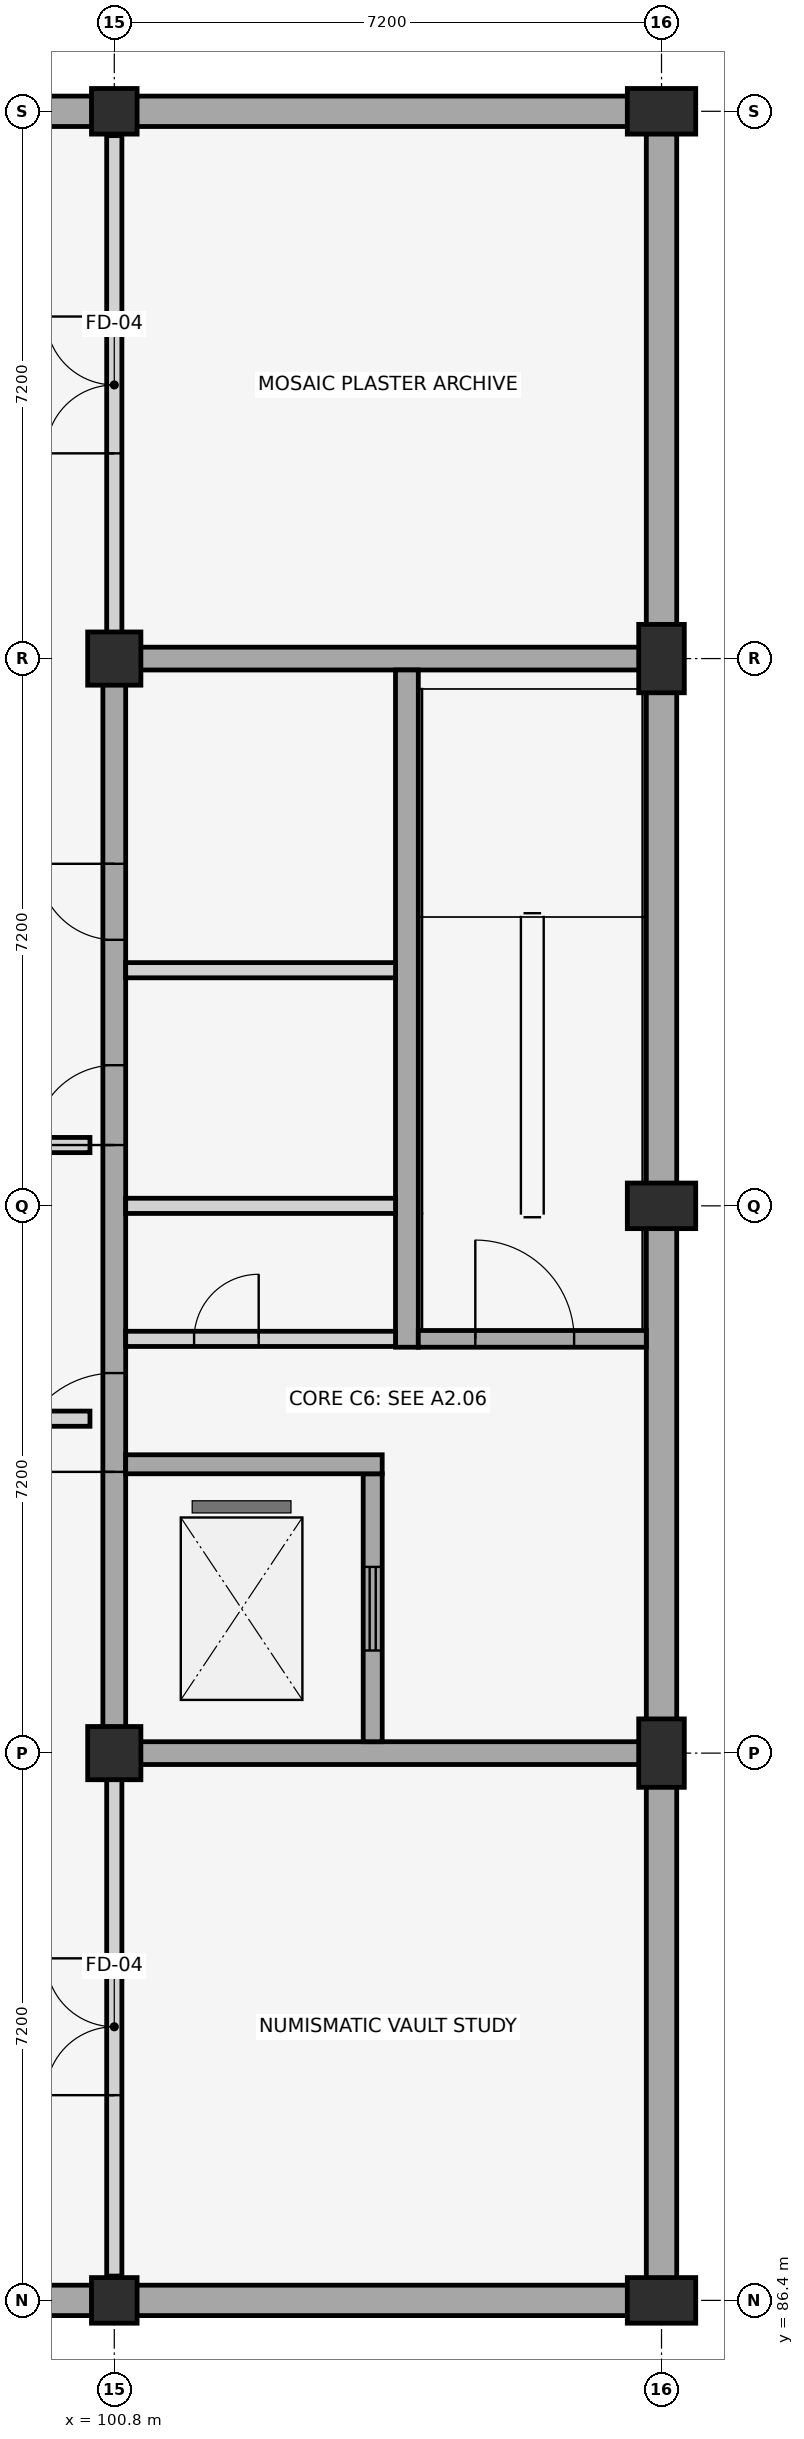
"""IFC4 building model, lengths in metres.
Left out: names, types, materials, properties, quantities, classifications, styles, units other than length and angle.
Written with IfcOpenShell. Run it as: python <this file> out.ifc"""

import sys

from ifc_helpers import new_model, si_unit, direction, frame, frame_2d, origin, origin_2d, place, context, subcontext, project, spatial, rectangle, extrude, element, fill, save


model = new_model("IFC4")
c1 = context("Model", 3, precision=1e-05, world=origin(), true_north=direction((0.0, 1.0)))
c2 = subcontext(c1, "Body", "Model", "MODEL_VIEW")
j1 = project(units=[si_unit("LENGTHUNIT", "METRE"), si_unit("PLANEANGLEUNIT", "RADIAN")], contexts=[c1])
p1 = place(None, origin())
s1 = spatial("IfcSite", under=j1, at=p1, CompositionType="ELEMENT")
p2 = place(p1, origin())
s2 = spatial("IfcBuilding", under=s1, at=p2, CompositionType="ELEMENT")
p3 = place(p2, frame((0.0, 0.0, -4.5)))
s3 = spatial("IfcBuildingStorey", under=s2, at=p3, CompositionType="ELEMENT", Elevation=-4.5)
p4 = place(p3, frame((57.4, 86.4, 0.0), z_axis=(0.0, 0.0, 1.0), x_axis=(1.0, 0.0, 0.0)))
e1 = element("IfcWall", 1, at=p4, inside=s3, PredefinedType="USERDEFINED", context=c2, shape_type="SweptSolid", body=[
    extrude(rectangle(XDim=50.8, YDim=0.4, at=frame_2d((25.4, 0.0))), origin(), (0.0, 0.0, 1.0), 3.67),
])
p5 = place(p4, frame((24.3, 0.0, 0.0)))
e2 = element("IfcOpeningElement", 2, at=p5, cuts=e1, PredefinedType="OPENING", context=c2, shape_type="SweptSolid", body=[
    extrude(rectangle(XDim=1.8, YDim=2.4, at=frame_2d((0.9, 1.2))), frame((0.0, 0.21, 0.0), z_axis=(0.0, -1.0, 0.0), x_axis=(1.0, 0.0, 0.0)), (0.0, 0.0, 1.0), 0.42),
])
p6 = place(p3, frame((108.0, 86.6, 0.0), z_axis=(0.0, 0.0, 1.0), x_axis=(0.0, 1.0, 0.0)))
e3 = element("IfcWall", 3, at=p6, inside=s3, PredefinedType="USERDEFINED", context=c2, shape_type="SweptSolid", body=[
    extrude(rectangle(XDim=28.4, YDim=0.4, at=frame_2d((14.2, 0.0))), origin(), (0.0, 0.0, 1.0), 3.67),
])
p7 = place(p3, frame((108.2, 115.2, 0.0), z_axis=(0.0, 0.0, 1.0), x_axis=(-1.0, 0.0, 0.0)))
e4 = element("IfcWall", 4, at=p7, inside=s3, PredefinedType="USERDEFINED", context=c2, shape_type="SweptSolid", body=[
    extrude(rectangle(XDim=50.8, YDim=0.4, at=frame_2d((25.4, 0.0))), origin(), (0.0, 0.0, 1.0), 3.67),
])
p8 = place(p3, frame((100.8, 86.4, -0.45), z_axis=(0.0, 0.0, 1.0), x_axis=(1.0, 0.0, 0.0)))
e5 = element("IfcColumn", 5, at=p8, inside=s3, PredefinedType="COLUMN", context=c2, shape_type="SweptSolid", body=[
    extrude(rectangle(XDim=0.6, YDim=0.6, at=origin_2d()), origin(), (0.0, 0.0, 1.0), 4.95),
])
for number, where, z_axis, x_axis in (
    (6, (100.8, 93.6, -0.45), (0.0, 0.0, 1.0), (0.0, 1.0, 0.0)),
    (7, (100.8, 108.0, -0.45), (0.0, 0.0, 1.0), (0.0, 1.0, 0.0)),
):
    element("IfcColumn", number, at=place(p3, frame(where, z_axis=z_axis, x_axis=x_axis)), inside=s3, PredefinedType="COLUMN", context=c2, shape_type="SweptSolid", body=[
        extrude(rectangle(XDim=0.7, YDim=0.7, at=origin_2d()), origin(), (0.0, 0.0, 1.0), 4.95),
    ])
p9 = place(p3, frame((100.8, 115.2, -0.45), z_axis=(0.0, 0.0, 1.0), x_axis=(1.0, 0.0, 0.0)))
e8 = element("IfcColumn", 8, at=p9, inside=s3, PredefinedType="COLUMN", context=c2, shape_type="SweptSolid", body=[
    extrude(rectangle(XDim=0.6, YDim=0.6, at=origin_2d()), origin(), (0.0, 0.0, 1.0), 4.95),
])
for number, where, z_axis, x_axis in (
    (9, (108.0, 86.4, -0.45), (0.0, 0.0, 1.0), (0.0, 1.0, 0.0)),
    (10, (108.0, 93.6, -0.45), (0.0, 0.0, 1.0), (1.0, 0.0, 0.0)),
    (11, (108.0, 100.8, -0.45), (0.0, 0.0, 1.0), (0.0, 1.0, 0.0)),
    (12, (108.0, 108.0, -0.45), (0.0, 0.0, 1.0), (1.0, 0.0, 0.0)),
    (13, (108.0, 115.2, -0.45), (0.0, 0.0, 1.0), (0.0, 1.0, 0.0)),
):
    element("IfcColumn", number, at=place(p3, frame(where, z_axis=z_axis, x_axis=x_axis)), inside=s3, PredefinedType="PILASTER", context=c2, shape_type="SweptSolid", body=[
        extrude(rectangle(XDim=0.6, YDim=0.9, at=origin_2d()), origin(), (0.0, 0.0, 1.0), 4.95),
    ])
for number, where, z_axis, x_axis in (
    (14, (100.65, 93.6, 0.0), (0.0, 0.0, 1.0), (1.0, 0.0, 0.0)),
    (15, (100.65, 108.0, 0.0), (0.0, 0.0, 1.0), (1.0, 0.0, 0.0)),
):
    element("IfcWall", number, at=place(p3, frame(where, z_axis=z_axis, x_axis=x_axis)), inside=s3, PredefinedType="SHEAR", context=c2, shape_type="SweptSolid", body=[
        extrude(rectangle(XDim=7.15, YDim=0.3, at=frame_2d((3.575, 0.0))), origin(), (0.0, 0.0, 1.0), 4.25),
    ])
p10 = place(p3, frame((100.8, 93.75, 0.0), z_axis=(0.0, 0.0, 1.0), x_axis=(0.0, 1.0, 0.0)))
e16 = element("IfcWall", 16, at=p10, inside=s3, PredefinedType="SHEAR", context=c2, shape_type="SweptSolid", body=[
    extrude(rectangle(XDim=14.1, YDim=0.3, at=frame_2d((7.05, 0.0))), origin(), (0.0, 0.0, 1.0), 4.25),
])
p11 = place(p10, frame((3.55, 0.0, 0.0)))
e17 = element("IfcOpeningElement", 17, at=p11, cuts=e16, PredefinedType="OPENING", context=c2, shape_type="SweptSolid", body=[
    extrude(rectangle(XDim=1.3, YDim=2.2, at=frame_2d((0.65, 1.1))), frame((0.0, 0.16, 0.0), z_axis=(0.0, -1.0, 0.0), x_axis=(1.0, 0.0, 0.0)), (0.0, 0.0, 1.0), 0.32),
])
p12 = place(p10, frame((7.85, 0.0, 0.0)))
e18 = element("IfcOpeningElement", 18, at=p12, cuts=e16, PredefinedType="OPENING", context=c2, shape_type="SweptSolid", body=[
    extrude(rectangle(XDim=1.05, YDim=2.15, at=frame_2d((0.525, 1.075))), frame((0.0, 0.16, 0.0), z_axis=(0.0, -1.0, 0.0), x_axis=(1.0, 0.0, 0.0)), (0.0, 0.0, 1.0), 0.32),
])
p13 = place(p10, frame((10.55, 0.0, 0.0)))
e19 = element("IfcOpeningElement", 19, at=p13, cuts=e16, PredefinedType="OPENING", context=c2, shape_type="SweptSolid", body=[
    extrude(rectangle(XDim=1.0, YDim=2.15, at=frame_2d((0.5, 1.075))), frame((0.0, 0.16, 0.0), z_axis=(0.0, -1.0, 0.0), x_axis=(1.0, 0.0, 0.0)), (0.0, 0.0, 1.0), 0.32),
])
p14 = place(p3, frame((104.2, 93.75, 0.0), z_axis=(0.0, 0.0, 1.0), x_axis=(0.0, 1.0, 0.0)))
e20 = element("IfcWall", 20, at=p14, inside=s3, PredefinedType="SHEAR", context=c2, shape_type="SweptSolid", body=[
    extrude(rectangle(XDim=3.525, YDim=0.25, at=frame_2d((1.762, 0.0))), origin(), (0.0, 0.0, 1.0), 4.25),
])
p15 = place(p14, frame((1.2, 0.0, 0.0)))
e21 = element("IfcOpeningElement", 21, at=p15, cuts=e20, PredefinedType="OPENING", context=c2, shape_type="SweptSolid", body=[
    extrude(rectangle(XDim=1.1, YDim=2.15, at=frame_2d((0.55, 1.075))), frame((0.0, 0.135, 0.0), z_axis=(0.0, -1.0, 0.0), x_axis=(1.0, 0.0, 0.0)), (0.0, 0.0, 1.0), 0.27),
])
p16 = place(p3, frame((104.65, 98.94, 0.0), z_axis=(0.0, 0.0, 1.0), x_axis=(0.0, 1.0, 0.0)))
e22 = element("IfcWall", 22, at=p16, inside=s3, PredefinedType="SHEAR", context=c2, shape_type="SweptSolid", body=[
    extrude(rectangle(XDim=8.91, YDim=0.3, at=frame_2d((4.455, 0.0))), origin(), (0.0, 0.0, 1.0), 4.25),
])
p17 = place(p3, frame((100.95, 99.05, 0.0), z_axis=(0.0, 0.0, 1.0), x_axis=(1.0, 0.0, 0.0)))
e23 = element("IfcWall", 23, at=p17, inside=s3, PredefinedType="PLUMBINGWALL", context=c2, shape_type="SweptSolid", body=[
    extrude(rectangle(XDim=3.55, YDim=0.2, at=frame_2d((1.775, 0.0))), origin(), (0.0, 0.0, 1.0), 3.67),
])
p18 = place(p17, frame((0.9, 0.0, 0.0)))
e24 = element("IfcOpeningElement", 24, at=p18, cuts=e23, PredefinedType="OPENING", context=c2, shape_type="SweptSolid", body=[
    extrude(rectangle(XDim=0.85, YDim=2.05, at=frame_2d((0.425, 1.025))), frame((0.0, 0.11, 0.0), z_axis=(0.0, -1.0, 0.0), x_axis=(1.0, 0.0, 0.0)), (0.0, 0.0, 1.0), 0.22),
])
p19 = place(p3, frame((104.8, 99.05, 0.0), z_axis=(0.0, 0.0, 1.0), x_axis=(1.0, 0.0, 0.0)))
e25 = element("IfcWall", 25, at=p19, inside=s3, PredefinedType="SHEAR", context=c2, shape_type="SweptSolid", body=[
    extrude(rectangle(XDim=3.0, YDim=0.22, at=frame_2d((1.5, 0.0))), origin(), (0.0, 0.0, 1.0), 4.25),
])
p20 = place(p19, frame((0.75, 0.0, 0.0)))
e26 = element("IfcOpeningElement", 26, at=p20, cuts=e25, PredefinedType="OPENING", context=c2, shape_type="SweptSolid", body=[
    extrude(rectangle(XDim=1.3, YDim=2.2, at=frame_2d((0.65, 1.1))), frame((0.0, 0.12, 0.0), z_axis=(0.0, -1.0, 0.0), x_axis=(1.0, 0.0, 0.0)), (0.0, 0.0, 1.0), 0.24),
])
p21 = place(p3, frame((100.95, 97.4, 0.0), z_axis=(0.0, 0.0, 1.0), x_axis=(1.0, 0.0, 0.0)))
e27 = element("IfcWall", 27, at=p21, inside=s3, PredefinedType="SHEAR", context=c2, shape_type="SweptSolid", body=[
    extrude(rectangle(XDim=3.375, YDim=0.25, at=frame_2d((1.688, 0.0))), origin(), (0.0, 0.0, 1.0), 4.25),
])
for number, where, z_axis, x_axis in (
    (28, (100.95, 100.8, 0.0), (0.0, 0.0, 1.0), (1.0, 0.0, 0.0)),
    (29, (100.95, 103.9, 0.0), (0.0, 0.0, 1.0), (1.0, 0.0, 0.0)),
):
    element("IfcWall", number, at=place(p3, frame(where, z_axis=z_axis, x_axis=x_axis)), inside=s3, PredefinedType="PLUMBINGWALL", context=c2, shape_type="SweptSolid", body=[
        extrude(rectangle(XDim=3.55, YDim=0.2, at=frame_2d((1.775, 0.0))), origin(), (0.0, 0.0, 1.0), 3.67),
    ])
p22 = place(p3, frame((86.72, 98.0, 0.0), z_axis=(0.0, 0.0, 1.0), x_axis=(1.0, 0.0, 0.0)))
e30 = element("IfcWall", 30, at=p22, inside=s3, PredefinedType="PARTITIONING", context=c2, shape_type="SweptSolid", body=[
    extrude(rectangle(XDim=13.76, YDim=0.2, at=frame_2d((6.88, 0.0))), origin(), (0.0, 0.0, 1.0), 3.45),
])
p23 = place(p22, frame((1.702, 0.0, 0.0)))
e31 = element("IfcOpeningElement", 31, at=p23, cuts=e30, PredefinedType="OPENING", context=c2, shape_type="SweptSolid", body=[
    extrude(rectangle(XDim=1.6, YDim=2.35, at=frame_2d((0.8, 1.175))), frame((0.0, 0.11, 0.0), z_axis=(0.0, -1.0, 0.0), x_axis=(1.0, 0.0, 0.0)), (0.0, 0.0, 1.0), 0.22),
])
p24 = place(p3, frame((86.72, 101.6, 0.0), z_axis=(0.0, 0.0, 1.0), x_axis=(1.0, 0.0, 0.0)))
e32 = element("IfcWall", 32, at=p24, inside=s3, PredefinedType="PARTITIONING", context=c2, shape_type="SweptSolid", body=[
    extrude(rectangle(XDim=13.76, YDim=0.2, at=frame_2d((6.88, 0.0))), origin(), (0.0, 0.0, 1.0), 3.45),
])
p25 = place(p24, frame((1.702, 0.0, 0.0)))
e33 = element("IfcOpeningElement", 33, at=p25, cuts=e32, PredefinedType="OPENING", context=c2, shape_type="SweptSolid", body=[
    extrude(rectangle(XDim=1.6, YDim=2.35, at=frame_2d((0.8, 1.175))), frame((0.0, 0.11, 0.0), z_axis=(0.0, -1.0, 0.0), x_axis=(1.0, 0.0, 0.0)), (0.0, 0.0, 1.0), 0.22),
])
p26 = place(p3, frame((100.8, 86.72, 0.0), z_axis=(0.0, 0.0, 1.0), x_axis=(0.0, 1.0, 0.0)))
e34 = element("IfcWall", 34, at=p26, inside=s3, PredefinedType="PARTITIONING", context=c2, shape_type="SweptSolid", body=[
    extrude(rectangle(XDim=6.56, YDim=0.2, at=frame_2d((3.28, 0.0))), origin(), (0.0, 0.0, 1.0), 3.45),
])
p27 = place(p26, frame((2.38, 0.0, 0.0)))
e35 = element("IfcOpeningElement", 35, at=p27, cuts=e34, PredefinedType="OPENING", context=c2, shape_type="SweptSolid", body=[
    extrude(rectangle(XDim=1.8, YDim=2.4, at=frame_2d((0.9, 1.2))), frame((0.0, 0.11, 0.0), z_axis=(0.0, -1.0, 0.0), x_axis=(1.0, 0.0, 0.0)), (0.0, 0.0, 1.0), 0.22),
])
p28 = place(p3, frame((100.8, 108.32, 0.0), z_axis=(0.0, 0.0, 1.0), x_axis=(0.0, 1.0, 0.0)))
e36 = element("IfcWall", 36, at=p28, inside=s3, PredefinedType="PARTITIONING", context=c2, shape_type="SweptSolid", body=[
    extrude(rectangle(XDim=6.56, YDim=0.2, at=frame_2d((3.28, 0.0))), origin(), (0.0, 0.0, 1.0), 3.45),
])
p29 = place(p28, frame((2.38, 0.0, 0.0)))
e37 = element("IfcOpeningElement", 37, at=p29, cuts=e36, PredefinedType="OPENING", context=c2, shape_type="SweptSolid", body=[
    extrude(rectangle(XDim=1.8, YDim=2.4, at=frame_2d((0.9, 1.2))), frame((0.0, 0.11, 0.0), z_axis=(0.0, -1.0, 0.0), x_axis=(1.0, 0.0, 0.0)), (0.0, 0.0, 1.0), 0.22),
])
p30 = place(p11, origin())
e38 = element("IfcDoor", 38, at=p30, inside=s3, OperationType="SINGLE_SWING_LEFT", PredefinedType="DOOR", context=c2, shape_type="SweptSolid", body=[
    extrude(rectangle(XDim=1.3, YDim=2.2, at=frame_2d((0.65, 1.1))), frame((0.0, 0.025, 0.0), z_axis=(0.0, -1.0, 0.0), x_axis=(1.0, 0.0, 0.0)), (0.0, 0.0, 1.0), 0.05),
])
fill(e17, e38)
p31 = place(p12, origin())
e39 = element("IfcDoor", 39, at=p31, inside=s3, OperationType="SINGLE_SWING_LEFT", PredefinedType="DOOR", context=c2, shape_type="SweptSolid", body=[
    extrude(rectangle(XDim=1.05, YDim=2.15, at=frame_2d((0.525, 1.075))), frame((0.0, 0.025, 0.0), z_axis=(0.0, -1.0, 0.0), x_axis=(1.0, 0.0, 0.0)), (0.0, 0.0, 1.0), 0.05),
])
fill(e18, e39)
p32 = place(p13, origin())
e40 = element("IfcDoor", 40, at=p32, inside=s3, OperationType="SINGLE_SWING_RIGHT", PredefinedType="DOOR", context=c2, shape_type="SweptSolid", body=[
    extrude(rectangle(XDim=1.0, YDim=2.15, at=frame_2d((0.5, 1.075))), frame((0.0, 0.025, 0.0), z_axis=(0.0, -1.0, 0.0), x_axis=(1.0, 0.0, 0.0)), (0.0, 0.0, 1.0), 0.05),
])
fill(e19, e40)
p33 = place(p15, origin())
e41 = element("IfcDoor", 41, at=p33, inside=s3, OperationType="SLIDING_TO_LEFT", PredefinedType="DOOR", context=c2, shape_type="SweptSolid", body=[
    extrude(rectangle(XDim=1.1, YDim=2.15, at=frame_2d((0.55, 1.075))), frame((0.0, 0.025, 0.0), z_axis=(0.0, -1.0, 0.0), x_axis=(1.0, 0.0, 0.0)), (0.0, 0.0, 1.0), 0.05),
])
fill(e21, e41)
p34 = place(p18, origin())
e42 = element("IfcDoor", 42, at=p34, inside=s3, OperationType="SINGLE_SWING_RIGHT", PredefinedType="TRAPDOOR", context=c2, shape_type="SweptSolid", body=[
    extrude(rectangle(XDim=0.85, YDim=2.05, at=frame_2d((0.425, 1.025))), frame((0.0, 0.025, 0.0), z_axis=(0.0, -1.0, 0.0), x_axis=(1.0, 0.0, 0.0)), (0.0, 0.0, 1.0), 0.05),
])
fill(e24, e42)
p35 = place(p20, origin())
e43 = element("IfcDoor", 43, at=p35, inside=s3, OperationType="SINGLE_SWING_LEFT", PredefinedType="DOOR", context=c2, shape_type="SweptSolid", body=[
    extrude(rectangle(XDim=1.3, YDim=2.2, at=frame_2d((0.65, 1.1))), frame((0.0, 0.025, 0.0), z_axis=(0.0, -1.0, 0.0), x_axis=(1.0, 0.0, 0.0)), (0.0, 0.0, 1.0), 0.05),
])
fill(e26, e43)
p36 = place(p27, origin())
e44 = element("IfcDoor", 44, at=p36, inside=s3, OperationType="DOUBLE_DOOR_SINGLE_SWING", PredefinedType="DOOR", context=c2, shape_type="SweptSolid", body=[
    extrude(rectangle(XDim=1.8, YDim=2.4, at=frame_2d((0.9, 1.2))), frame((0.0, 0.025, 0.0), z_axis=(0.0, -1.0, 0.0), x_axis=(1.0, 0.0, 0.0)), (0.0, 0.0, 1.0), 0.05),
])
fill(e35, e44)
p37 = place(p29, origin())
e45 = element("IfcDoor", 45, at=p37, inside=s3, OperationType="DOUBLE_DOOR_SINGLE_SWING", PredefinedType="DOOR", context=c2, shape_type="SweptSolid", body=[
    extrude(rectangle(XDim=1.8, YDim=2.4, at=frame_2d((0.9, 1.2))), frame((0.0, 0.025, 0.0), z_axis=(0.0, -1.0, 0.0), x_axis=(1.0, 0.0, 0.0)), (0.0, 0.0, 1.0), 0.05),
])
fill(e37, e45)
save(model, sys.argv[1])
